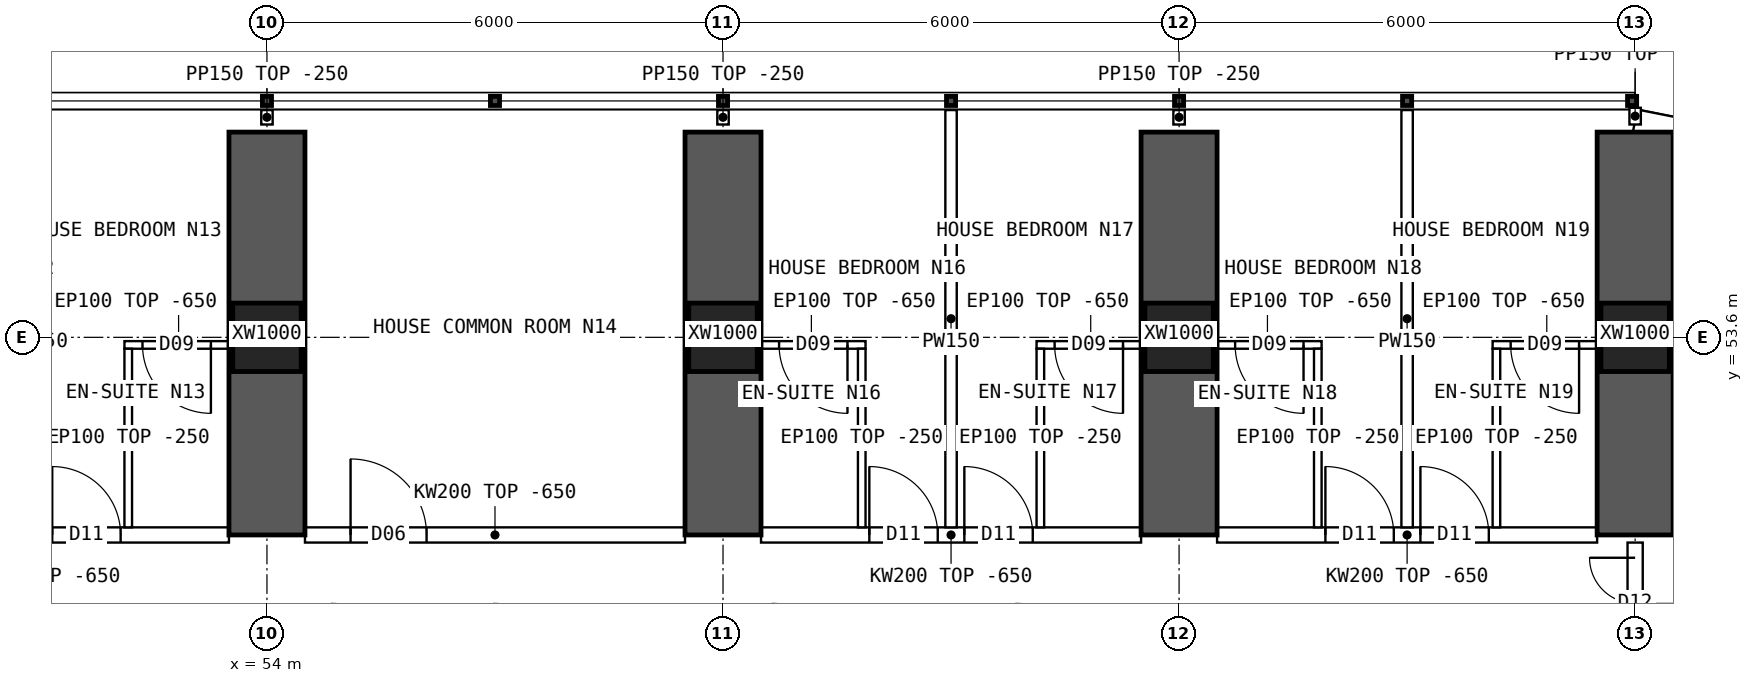
"""IFC4 building model, lengths in metres.
Left out: names, types, materials, properties, quantities, classifications, styles, units other than length and angle.
Written with IfcOpenShell. Run it as: python <this file> out.ifc"""

import sys

from ifc_helpers import new_model, si_unit, direction, frame, frame_2d, origin, origin_2d, place, context, subcontext, project, spatial, polyline, rectangle, hollow_rectangle, outline, extrude, element, fill, save


model = new_model("IFC4")
c1 = context("Model", 3, precision=1e-05, world=origin(), true_north=direction((0.0, 1.0)))
c2 = subcontext(c1, "Body", "Model", "MODEL_VIEW")
j1 = project(units=[si_unit("LENGTHUNIT", "METRE"), si_unit("PLANEANGLEUNIT", "RADIAN")], contexts=[c1])
p1 = place(None, origin())
s1 = spatial("IfcSite", under=j1, at=p1, CompositionType="ELEMENT")
p2 = place(p1, origin())
s2 = spatial("IfcBuilding", under=s1, at=p2, CompositionType="ELEMENT")
p3 = place(p2, frame((0.0, 0.0, 27.7)))
s3 = spatial("IfcBuildingStorey", under=s2, at=p3, CompositionType="ELEMENT", Elevation=27.7)
for number, where, z_axis, x_axis in (
    (1, (54.0, 53.6, 0.0), (0.0, 0.0, 1.0), (1.0, 0.0, 0.0)),
    (2, (60.0, 53.6, 0.0), (0.0, 0.0, 1.0), (1.0, 0.0, 0.0)),
    (3, (66.0, 53.6, 0.0), (0.0, 0.0, 1.0), (1.0, 0.0, 0.0)),
    (4, (72.0, 53.6, 0.0), (0.0, 0.0, 1.0), (1.0, 0.0, 0.0)),
):
    element("IfcColumn", number, at=place(p3, frame(where, z_axis=z_axis, x_axis=x_axis)), inside=s3, PredefinedType="COLUMN", context=c2, shape_type="SweptSolid", body=[
        extrude(hollow_rectangle(XDim=0.9, YDim=0.9, WallThickness=0.09, at=origin_2d()), origin(), (0.0, 0.0, 1.0), 3.75),
    ])
for number, where, z_axis, x_axis in (
    (5, (54.0, 51.0, 0.0), (0.0, 0.0, 1.0), (0.0, 1.0, 0.0)),
    (6, (60.0, 51.0, 0.0), (0.0, 0.0, 1.0), (0.0, 1.0, 0.0)),
    (7, (66.0, 51.0, 0.0), (0.0, 0.0, 1.0), (0.0, 1.0, 0.0)),
    (8, (72.0, 51.0, 0.0), (0.0, 0.0, 1.0), (0.0, 1.0, 0.0)),
):
    element("IfcWall", number, at=place(p3, frame(where, z_axis=z_axis, x_axis=x_axis)), inside=s3, PredefinedType="SHEAR", context=c2, shape_type="SweptSolid", body=[
        extrude(rectangle(XDim=5.3, YDim=1.0, at=frame_2d((2.65, 0.0))), origin(), (0.0, 0.0, 1.0), 3.75),
    ])
p4 = place(p3, frame((75.157, 55.822, 0.0), z_axis=(0.0, 0.0, 1.0), x_axis=(-0.980787251524, 0.195080412259, 0.0)))
e9 = element("IfcWall", 9, at=p4, inside=s3, PredefinedType="SOLIDWALL", context=c2, shape_type="SweptSolid", body=[
    extrude(outline(polyline([(-0.03, -0.15), (3.249, -0.15), (3.189, 0.15), (0.03, 0.15), (-0.03, -0.15)])), origin(), (0.0, 0.0, 1.0), 3.5),
])
p5 = place(p4, frame((0.909, 0.0, 0.9)))
e10 = element("IfcOpeningElement", 10, at=p5, cuts=e9, PredefinedType="OPENING", context=c2, shape_type="SweptSolid", body=[
    extrude(rectangle(XDim=1.4, YDim=1.8, at=frame_2d((0.7, 0.9))), frame((0.0, 0.16, 0.0), z_axis=(0.0, -1.0, 0.0), x_axis=(1.0, 0.0, 0.0)), (0.0, 0.0, 1.0), 0.32),
])
p6 = place(p3, frame((48.5, 51.0, 0.0), z_axis=(0.0, 0.0, 1.0), x_axis=(1.0, 0.0, 0.0)))
e11 = element("IfcWall", 11, at=p6, inside=s3, PredefinedType="SOLIDWALL", context=c2, shape_type="SweptSolid", body=[
    extrude(outline(polyline([(0.0, 0.0), (5.0, 0.0), (5.0, 3.1), (0.0, 3.1), (0.0, 0.0)])), frame((0.0, 0.1, 0.0), z_axis=(0.0, -1.0, 0.0), x_axis=(1.0, 0.0, 0.0)), (0.0, 0.0, 1.0), 0.2),
])
p7 = place(p6, frame((1.425, 0.0, 0.0)))
e12 = element("IfcOpeningElement", 12, at=p7, cuts=e11, PredefinedType="OPENING", context=c2, shape_type="SweptSolid", body=[
    extrude(rectangle(XDim=0.9, YDim=2.1, at=frame_2d((0.45, 1.05))), frame((0.0, 0.11, 0.0), z_axis=(0.0, -1.0, 0.0), x_axis=(1.0, 0.0, 0.0)), (0.0, 0.0, 1.0), 0.22),
])
p8 = place(p6, frame((2.675, 0.0, 0.0)))
e13 = element("IfcOpeningElement", 13, at=p8, cuts=e11, PredefinedType="OPENING", context=c2, shape_type="SweptSolid", body=[
    extrude(rectangle(XDim=0.9, YDim=2.1, at=frame_2d((0.45, 1.05))), frame((0.0, 0.11, 0.0), z_axis=(0.0, -1.0, 0.0), x_axis=(1.0, 0.0, 0.0)), (0.0, 0.0, 1.0), 0.22),
])
p9 = place(p3, frame((54.5, 51.0, 0.0), z_axis=(0.0, 0.0, 1.0), x_axis=(1.0, 0.0, 0.0)))
e14 = element("IfcWall", 14, at=p9, inside=s3, PredefinedType="SOLIDWALL", context=c2, shape_type="SweptSolid", body=[
    extrude(outline(polyline([(0.0, 0.0), (5.0, 0.0), (5.0, 3.1), (0.0, 3.1), (0.0, 0.0)])), frame((0.0, 0.1, 0.0), z_axis=(0.0, -1.0, 0.0), x_axis=(1.0, 0.0, 0.0)), (0.0, 0.0, 1.0), 0.2),
])
p10 = place(p9, frame((0.6, 0.0, 0.0)))
e15 = element("IfcOpeningElement", 15, at=p10, cuts=e14, PredefinedType="OPENING", context=c2, shape_type="SweptSolid", body=[
    extrude(rectangle(XDim=1.0, YDim=2.1, at=frame_2d((0.5, 1.05))), frame((0.0, 0.11, 0.0), z_axis=(0.0, -1.0, 0.0), x_axis=(1.0, 0.0, 0.0)), (0.0, 0.0, 1.0), 0.22),
])
p11 = place(p3, frame((60.5, 51.0, 0.0), z_axis=(0.0, 0.0, 1.0), x_axis=(1.0, 0.0, 0.0)))
e16 = element("IfcWall", 16, at=p11, inside=s3, PredefinedType="SOLIDWALL", context=c2, shape_type="SweptSolid", body=[
    extrude(outline(polyline([(0.0, 0.0), (5.0, 0.0), (5.0, 3.1), (0.0, 3.1), (0.0, 0.0)])), frame((0.0, 0.1, 0.0), z_axis=(0.0, -1.0, 0.0), x_axis=(1.0, 0.0, 0.0)), (0.0, 0.0, 1.0), 0.2),
])
p12 = place(p11, frame((1.425, 0.0, 0.0)))
e17 = element("IfcOpeningElement", 17, at=p12, cuts=e16, PredefinedType="OPENING", context=c2, shape_type="SweptSolid", body=[
    extrude(rectangle(XDim=0.9, YDim=2.1, at=frame_2d((0.45, 1.05))), frame((0.0, 0.11, 0.0), z_axis=(0.0, -1.0, 0.0), x_axis=(1.0, 0.0, 0.0)), (0.0, 0.0, 1.0), 0.22),
])
p13 = place(p11, frame((2.675, 0.0, 0.0)))
e18 = element("IfcOpeningElement", 18, at=p13, cuts=e16, PredefinedType="OPENING", context=c2, shape_type="SweptSolid", body=[
    extrude(rectangle(XDim=0.9, YDim=2.1, at=frame_2d((0.45, 1.05))), frame((0.0, 0.11, 0.0), z_axis=(0.0, -1.0, 0.0), x_axis=(1.0, 0.0, 0.0)), (0.0, 0.0, 1.0), 0.22),
])
p14 = place(p3, frame((66.5, 51.0, 0.0), z_axis=(0.0, 0.0, 1.0), x_axis=(1.0, 0.0, 0.0)))
e19 = element("IfcWall", 19, at=p14, inside=s3, PredefinedType="SOLIDWALL", context=c2, shape_type="SweptSolid", body=[
    extrude(outline(polyline([(0.0, 0.0), (5.0, 0.0), (5.0, 3.1), (0.0, 3.1), (0.0, 0.0)])), frame((0.0, 0.1, 0.0), z_axis=(0.0, -1.0, 0.0), x_axis=(1.0, 0.0, 0.0)), (0.0, 0.0, 1.0), 0.2),
])
p15 = place(p14, frame((1.425, 0.0, 0.0)))
e20 = element("IfcOpeningElement", 20, at=p15, cuts=e19, PredefinedType="OPENING", context=c2, shape_type="SweptSolid", body=[
    extrude(rectangle(XDim=0.9, YDim=2.1, at=frame_2d((0.45, 1.05))), frame((0.0, 0.11, 0.0), z_axis=(0.0, -1.0, 0.0), x_axis=(1.0, 0.0, 0.0)), (0.0, 0.0, 1.0), 0.22),
])
p16 = place(p14, frame((2.675, 0.0, 0.0)))
e21 = element("IfcOpeningElement", 21, at=p16, cuts=e19, PredefinedType="OPENING", context=c2, shape_type="SweptSolid", body=[
    extrude(rectangle(XDim=0.9, YDim=2.1, at=frame_2d((0.45, 1.05))), frame((0.0, 0.11, 0.0), z_axis=(0.0, -1.0, 0.0), x_axis=(1.0, 0.0, 0.0)), (0.0, 0.0, 1.0), 0.22),
])
p17 = place(p3, frame((52.125, 53.5, 0.0), z_axis=(0.0, 0.0, 1.0), x_axis=(1.0, 0.0, 0.0)))
e22 = element("IfcWall", 22, at=p17, inside=s3, PredefinedType="PARTITIONING", context=c2, shape_type="SweptSolid", body=[
    extrude(outline(polyline([(0.0, 0.0), (1.425, 0.0), (1.425, 3.1), (0.0, 3.1), (0.0, 0.0)])), frame((0.0, 0.05, 0.0), z_axis=(0.0, -1.0, 0.0), x_axis=(1.0, 0.0, 0.0)), (0.0, 0.0, 1.0), 0.1),
])
p18 = place(p17, frame((0.238, 0.0, 0.0)))
e23 = element("IfcOpeningElement", 23, at=p18, cuts=e22, PredefinedType="OPENING", context=c2, shape_type="SweptSolid", body=[
    extrude(rectangle(XDim=0.9, YDim=2.1, at=frame_2d((0.45, 1.05))), frame((0.0, 0.06, 0.0), z_axis=(0.0, -1.0, 0.0), x_axis=(1.0, 0.0, 0.0)), (0.0, 0.0, 1.0), 0.12),
])
p19 = place(p3, frame((52.175, 53.45, 0.0), z_axis=(0.0, 0.0, 1.0), x_axis=(0.0, -1.0, 0.0)))
e24 = element("IfcWall", 24, at=p19, inside=s3, PredefinedType="PARTITIONING", context=c2, shape_type="SweptSolid", body=[
    extrude(outline(polyline([(0.0, 0.0), (2.35, 0.0), (2.35, 3.1), (2.302, 3.1), (2.3, 3.5), (0.052, 3.5), (0.05, 3.1), (0.0, 3.1), (0.0, 0.0)])), frame((0.0, 0.05, 0.0), z_axis=(0.0, -1.0, 0.0), x_axis=(1.0, 0.0, 0.0)), (0.0, 0.0, 1.0), 0.1),
])
p20 = place(p3, frame((63.0, 56.59, 0.0), z_axis=(0.0, 0.0, 1.0), x_axis=(0.0, -1.0, 0.0)))
e25 = element("IfcWall", 25, at=p20, inside=s3, PredefinedType="PARTITIONING", context=c2, shape_type="SweptSolid", body=[
    extrude(outline(polyline([(0.0, 0.0), (5.49, 0.0), (5.49, 3.1), (5.442, 3.1), (5.44, 3.5), (3.192, 3.5), (3.19, 3.1), (2.792, 3.1), (2.79, 3.5), (0.0, 3.5), (0.0, 0.0)])), frame((0.0, 0.075, 0.0), z_axis=(0.0, -1.0, 0.0), x_axis=(1.0, 0.0, 0.0)), (0.0, 0.0, 1.0), 0.15),
])
p21 = place(p3, frame((60.45, 53.5, 0.0), z_axis=(0.0, 0.0, 1.0), x_axis=(1.0, 0.0, 0.0)))
e26 = element("IfcWall", 26, at=p21, inside=s3, PredefinedType="PARTITIONING", context=c2, shape_type="SweptSolid", body=[
    extrude(outline(polyline([(0.0, 0.0), (1.425, 0.0), (1.425, 3.1), (0.0, 3.1), (0.0, 0.0)])), frame((0.0, 0.05, 0.0), z_axis=(0.0, -1.0, 0.0), x_axis=(1.0, 0.0, 0.0)), (0.0, 0.0, 1.0), 0.1),
])
p22 = place(p21, frame((0.288, 0.0, 0.0)))
e27 = element("IfcOpeningElement", 27, at=p22, cuts=e26, PredefinedType="OPENING", context=c2, shape_type="SweptSolid", body=[
    extrude(rectangle(XDim=0.9, YDim=2.1, at=frame_2d((0.45, 1.05))), frame((0.0, 0.06, 0.0), z_axis=(0.0, -1.0, 0.0), x_axis=(1.0, 0.0, 0.0)), (0.0, 0.0, 1.0), 0.12),
])
p23 = place(p3, frame((61.825, 53.45, 0.0), z_axis=(0.0, 0.0, 1.0), x_axis=(0.0, -1.0, 0.0)))
e28 = element("IfcWall", 28, at=p23, inside=s3, PredefinedType="PARTITIONING", context=c2, shape_type="SweptSolid", body=[
    extrude(outline(polyline([(0.0, 0.0), (2.35, 0.0), (2.35, 3.1), (2.302, 3.1), (2.3, 3.5), (0.052, 3.5), (0.05, 3.1), (0.0, 3.1), (0.0, 0.0)])), frame((0.0, 0.05, 0.0), z_axis=(0.0, -1.0, 0.0), x_axis=(1.0, 0.0, 0.0)), (0.0, 0.0, 1.0), 0.1),
])
p24 = place(p3, frame((64.125, 53.5, 0.0), z_axis=(0.0, 0.0, 1.0), x_axis=(1.0, 0.0, 0.0)))
e29 = element("IfcWall", 29, at=p24, inside=s3, PredefinedType="PARTITIONING", context=c2, shape_type="SweptSolid", body=[
    extrude(outline(polyline([(0.0, 0.0), (1.425, 0.0), (1.425, 3.1), (0.0, 3.1), (0.0, 0.0)])), frame((0.0, 0.05, 0.0), z_axis=(0.0, -1.0, 0.0), x_axis=(1.0, 0.0, 0.0)), (0.0, 0.0, 1.0), 0.1),
])
p25 = place(p24, frame((0.238, 0.0, 0.0)))
e30 = element("IfcOpeningElement", 30, at=p25, cuts=e29, PredefinedType="OPENING", context=c2, shape_type="SweptSolid", body=[
    extrude(rectangle(XDim=0.9, YDim=2.1, at=frame_2d((0.45, 1.05))), frame((0.0, 0.06, 0.0), z_axis=(0.0, -1.0, 0.0), x_axis=(1.0, 0.0, 0.0)), (0.0, 0.0, 1.0), 0.12),
])
p26 = place(p3, frame((64.175, 53.45, 0.0), z_axis=(0.0, 0.0, 1.0), x_axis=(0.0, -1.0, 0.0)))
e31 = element("IfcWall", 31, at=p26, inside=s3, PredefinedType="PARTITIONING", context=c2, shape_type="SweptSolid", body=[
    extrude(outline(polyline([(0.0, 0.0), (2.35, 0.0), (2.35, 3.1), (2.302, 3.1), (2.3, 3.5), (0.052, 3.5), (0.05, 3.1), (0.0, 3.1), (0.0, 0.0)])), frame((0.0, 0.05, 0.0), z_axis=(0.0, -1.0, 0.0), x_axis=(1.0, 0.0, 0.0)), (0.0, 0.0, 1.0), 0.1),
])
p27 = place(p3, frame((69.0, 56.59, 0.0), z_axis=(0.0, 0.0, 1.0), x_axis=(0.0, -1.0, 0.0)))
e32 = element("IfcWall", 32, at=p27, inside=s3, PredefinedType="PARTITIONING", context=c2, shape_type="SweptSolid", body=[
    extrude(outline(polyline([(0.0, 0.0), (5.49, 0.0), (5.49, 3.1), (5.442, 3.1), (5.44, 3.5), (3.192, 3.5), (3.19, 3.1), (2.792, 3.1), (2.79, 3.5), (0.0, 3.5), (0.0, 0.0)])), frame((0.0, 0.075, 0.0), z_axis=(0.0, -1.0, 0.0), x_axis=(1.0, 0.0, 0.0)), (0.0, 0.0, 1.0), 0.15),
])
p28 = place(p3, frame((66.45, 53.5, 0.0), z_axis=(0.0, 0.0, 1.0), x_axis=(1.0, 0.0, 0.0)))
e33 = element("IfcWall", 33, at=p28, inside=s3, PredefinedType="PARTITIONING", context=c2, shape_type="SweptSolid", body=[
    extrude(outline(polyline([(0.0, 0.0), (1.425, 0.0), (1.425, 3.1), (0.0, 3.1), (0.0, 0.0)])), frame((0.0, 0.05, 0.0), z_axis=(0.0, -1.0, 0.0), x_axis=(1.0, 0.0, 0.0)), (0.0, 0.0, 1.0), 0.1),
])
p29 = place(p28, frame((0.288, 0.0, 0.0)))
e34 = element("IfcOpeningElement", 34, at=p29, cuts=e33, PredefinedType="OPENING", context=c2, shape_type="SweptSolid", body=[
    extrude(rectangle(XDim=0.9, YDim=2.1, at=frame_2d((0.45, 1.05))), frame((0.0, 0.06, 0.0), z_axis=(0.0, -1.0, 0.0), x_axis=(1.0, 0.0, 0.0)), (0.0, 0.0, 1.0), 0.12),
])
p30 = place(p3, frame((67.825, 53.45, 0.0), z_axis=(0.0, 0.0, 1.0), x_axis=(0.0, -1.0, 0.0)))
e35 = element("IfcWall", 35, at=p30, inside=s3, PredefinedType="PARTITIONING", context=c2, shape_type="SweptSolid", body=[
    extrude(outline(polyline([(0.0, 0.0), (2.35, 0.0), (2.35, 3.1), (2.302, 3.1), (2.3, 3.5), (0.052, 3.5), (0.05, 3.1), (0.0, 3.1), (0.0, 0.0)])), frame((0.0, 0.05, 0.0), z_axis=(0.0, -1.0, 0.0), x_axis=(1.0, 0.0, 0.0)), (0.0, 0.0, 1.0), 0.1),
])
p31 = place(p3, frame((70.125, 53.5, 0.0), z_axis=(0.0, 0.0, 1.0), x_axis=(1.0, 0.0, 0.0)))
e36 = element("IfcWall", 36, at=p31, inside=s3, PredefinedType="PARTITIONING", context=c2, shape_type="SweptSolid", body=[
    extrude(outline(polyline([(0.0, 0.0), (1.425, 0.0), (1.425, 3.1), (0.0, 3.1), (0.0, 0.0)])), frame((0.0, 0.05, 0.0), z_axis=(0.0, -1.0, 0.0), x_axis=(1.0, 0.0, 0.0)), (0.0, 0.0, 1.0), 0.1),
])
p32 = place(p31, frame((0.238, 0.0, 0.0)))
e37 = element("IfcOpeningElement", 37, at=p32, cuts=e36, PredefinedType="OPENING", context=c2, shape_type="SweptSolid", body=[
    extrude(rectangle(XDim=0.9, YDim=2.1, at=frame_2d((0.45, 1.05))), frame((0.0, 0.06, 0.0), z_axis=(0.0, -1.0, 0.0), x_axis=(1.0, 0.0, 0.0)), (0.0, 0.0, 1.0), 0.12),
])
p33 = place(p3, frame((70.175, 53.45, 0.0), z_axis=(0.0, 0.0, 1.0), x_axis=(0.0, -1.0, 0.0)))
e38 = element("IfcWall", 38, at=p33, inside=s3, PredefinedType="PARTITIONING", context=c2, shape_type="SweptSolid", body=[
    extrude(outline(polyline([(0.0, 0.0), (2.35, 0.0), (2.35, 3.1), (2.302, 3.1), (2.3, 3.5), (0.052, 3.5), (0.05, 3.1), (0.0, 3.1), (0.0, 0.0)])), frame((0.0, 0.05, 0.0), z_axis=(0.0, -1.0, 0.0), x_axis=(1.0, 0.0, 0.0)), (0.0, 0.0, 1.0), 0.1),
])
p34 = place(p3, frame((72.0, 49.3, 0.0), z_axis=(0.0, 0.0, 1.0), x_axis=(0.0, 1.0, 0.0)))
e39 = element("IfcWall", 39, at=p34, inside=s3, PredefinedType="SOLIDWALL", context=c2, shape_type="SweptSolid", body=[
    extrude(outline(polyline([(0.0, 0.0), (1.6, 0.0), (1.6, 3.05), (0.0, 3.05), (0.0, 0.0)])), frame((0.0, 0.1, 0.0), z_axis=(0.0, -1.0, 0.0), x_axis=(1.0, 0.0, 0.0)), (0.0, 0.0, 1.0), 0.2),
])
p35 = place(p34, frame((0.2, 0.0, 0.0)))
e40 = element("IfcOpeningElement", 40, at=p35, cuts=e39, PredefinedType="OPENING", context=c2, shape_type="SweptSolid", body=[
    extrude(rectangle(XDim=1.2, YDim=2.1, at=frame_2d((0.6, 1.05))), frame((0.0, 0.11, 0.0), z_axis=(0.0, -1.0, 0.0), x_axis=(1.0, 0.0, 0.0)), (0.0, 0.0, 1.0), 0.22),
])
for number, where, z_axis, x_axis in (
    (41, (54.0, 56.4, 0.0), (0.0, 0.0, 1.0), (0.0, 1.0, 0.0)),
    (42, (60.0, 56.4, 0.0), (0.0, 0.0, 1.0), (0.0, 1.0, 0.0)),
    (43, (66.0, 56.4, 0.0), (0.0, 0.0, 1.0), (0.0, 1.0, 0.0)),
):
    element("IfcWall", number, at=place(p3, frame(where, z_axis=z_axis, x_axis=x_axis)), inside=s3, PredefinedType="PARTITIONING", context=c2, shape_type="SweptSolid", body=[
        extrude(rectangle(XDim=0.19, YDim=0.15, at=frame_2d((0.095, 0.0))), origin(), (0.0, 0.0, 1.0), 3.5),
    ])
p36 = place(p3, frame((72.0, 56.4, 0.0), z_axis=(0.0, 0.0, 1.0), x_axis=(0.0, 1.0, 0.0)))
e44 = element("IfcWall", 44, at=p36, inside=s3, PredefinedType="PARTITIONING", context=c2, shape_type="SweptSolid", body=[
    extrude(rectangle(XDim=0.22, YDim=0.15, at=frame_2d((0.11, 0.0))), origin(), (0.0, 0.0, 1.0), 3.5),
])
p37 = place(p18, origin())
e45 = element("IfcDoor", 45, at=p37, inside=s3, OperationType="SINGLE_SWING_RIGHT", PredefinedType="DOOR", context=c2, shape_type="SweptSolid", body=[
    extrude(rectangle(XDim=0.9, YDim=2.1, at=frame_2d((0.45, 1.05))), frame((0.0, 0.025, 0.0), z_axis=(0.0, -1.0, 0.0), x_axis=(1.0, 0.0, 0.0)), (0.0, 0.0, 1.0), 0.05),
])
fill(e23, e45)
p38 = place(p8, origin())
e46 = element("IfcDoor", 46, at=p38, inside=s3, OperationType="SINGLE_SWING_LEFT", PredefinedType="DOOR", context=c2, shape_type="SweptSolid", body=[
    extrude(rectangle(XDim=0.9, YDim=2.1, at=frame_2d((0.45, 1.05))), frame((0.0, 0.025, 0.0), z_axis=(0.0, -1.0, 0.0), x_axis=(1.0, 0.0, 0.0)), (0.0, 0.0, 1.0), 0.05),
])
fill(e13, e46)
p39 = place(p10, origin())
e47 = element("IfcDoor", 47, at=p39, inside=s3, OperationType="SINGLE_SWING_LEFT", PredefinedType="DOOR", context=c2, shape_type="SweptSolid", body=[
    extrude(rectangle(XDim=1.0, YDim=2.1, at=frame_2d((0.5, 1.05))), frame((0.0, 0.025, 0.0), z_axis=(0.0, -1.0, 0.0), x_axis=(1.0, 0.0, 0.0)), (0.0, 0.0, 1.0), 0.05),
])
fill(e15, e47)
p40 = place(p22, origin())
e48 = element("IfcDoor", 48, at=p40, inside=s3, OperationType="SINGLE_SWING_RIGHT", PredefinedType="DOOR", context=c2, shape_type="SweptSolid", body=[
    extrude(rectangle(XDim=0.9, YDim=2.1, at=frame_2d((0.45, 1.05))), frame((0.0, 0.025, 0.0), z_axis=(0.0, -1.0, 0.0), x_axis=(1.0, 0.0, 0.0)), (0.0, 0.0, 1.0), 0.05),
])
fill(e27, e48)
p41 = place(p12, origin())
e49 = element("IfcDoor", 49, at=p41, inside=s3, OperationType="SINGLE_SWING_LEFT", PredefinedType="DOOR", context=c2, shape_type="SweptSolid", body=[
    extrude(rectangle(XDim=0.9, YDim=2.1, at=frame_2d((0.45, 1.05))), frame((0.0, 0.025, 0.0), z_axis=(0.0, -1.0, 0.0), x_axis=(1.0, 0.0, 0.0)), (0.0, 0.0, 1.0), 0.05),
])
fill(e17, e49)
p42 = place(p25, origin())
e50 = element("IfcDoor", 50, at=p42, inside=s3, OperationType="SINGLE_SWING_RIGHT", PredefinedType="DOOR", context=c2, shape_type="SweptSolid", body=[
    extrude(rectangle(XDim=0.9, YDim=2.1, at=frame_2d((0.45, 1.05))), frame((0.0, 0.025, 0.0), z_axis=(0.0, -1.0, 0.0), x_axis=(1.0, 0.0, 0.0)), (0.0, 0.0, 1.0), 0.05),
])
fill(e30, e50)
p43 = place(p13, origin())
e51 = element("IfcDoor", 51, at=p43, inside=s3, OperationType="SINGLE_SWING_LEFT", PredefinedType="DOOR", context=c2, shape_type="SweptSolid", body=[
    extrude(rectangle(XDim=0.9, YDim=2.1, at=frame_2d((0.45, 1.05))), frame((0.0, 0.025, 0.0), z_axis=(0.0, -1.0, 0.0), x_axis=(1.0, 0.0, 0.0)), (0.0, 0.0, 1.0), 0.05),
])
fill(e18, e51)
p44 = place(p29, origin())
e52 = element("IfcDoor", 52, at=p44, inside=s3, OperationType="SINGLE_SWING_RIGHT", PredefinedType="DOOR", context=c2, shape_type="SweptSolid", body=[
    extrude(rectangle(XDim=0.9, YDim=2.1, at=frame_2d((0.45, 1.05))), frame((0.0, 0.025, 0.0), z_axis=(0.0, -1.0, 0.0), x_axis=(1.0, 0.0, 0.0)), (0.0, 0.0, 1.0), 0.05),
])
fill(e34, e52)
p45 = place(p15, origin())
e53 = element("IfcDoor", 53, at=p45, inside=s3, OperationType="SINGLE_SWING_LEFT", PredefinedType="DOOR", context=c2, shape_type="SweptSolid", body=[
    extrude(rectangle(XDim=0.9, YDim=2.1, at=frame_2d((0.45, 1.05))), frame((0.0, 0.025, 0.0), z_axis=(0.0, -1.0, 0.0), x_axis=(1.0, 0.0, 0.0)), (0.0, 0.0, 1.0), 0.05),
])
fill(e20, e53)
p46 = place(p32, origin())
e54 = element("IfcDoor", 54, at=p46, inside=s3, OperationType="SINGLE_SWING_RIGHT", PredefinedType="DOOR", context=c2, shape_type="SweptSolid", body=[
    extrude(rectangle(XDim=0.9, YDim=2.1, at=frame_2d((0.45, 1.05))), frame((0.0, 0.025, 0.0), z_axis=(0.0, -1.0, 0.0), x_axis=(1.0, 0.0, 0.0)), (0.0, 0.0, 1.0), 0.05),
])
fill(e37, e54)
p47 = place(p16, origin())
e55 = element("IfcDoor", 55, at=p47, inside=s3, OperationType="SINGLE_SWING_LEFT", PredefinedType="DOOR", context=c2, shape_type="SweptSolid", body=[
    extrude(rectangle(XDim=0.9, YDim=2.1, at=frame_2d((0.45, 1.05))), frame((0.0, 0.025, 0.0), z_axis=(0.0, -1.0, 0.0), x_axis=(1.0, 0.0, 0.0)), (0.0, 0.0, 1.0), 0.05),
])
fill(e21, e55)
p48 = place(p35, origin())
e56 = element("IfcDoor", 56, at=p48, inside=s3, OperationType="DOUBLE_DOOR_SINGLE_SWING", PredefinedType="DOOR", context=c2, shape_type="SweptSolid", body=[
    extrude(rectangle(XDim=1.2, YDim=2.1, at=frame_2d((0.6, 1.05))), frame((0.0, 0.025, 0.0), z_axis=(0.0, -1.0, 0.0), x_axis=(1.0, 0.0, 0.0)), (0.0, 0.0, 1.0), 0.05),
])
fill(e40, e56)
save(model, sys.argv[1])
